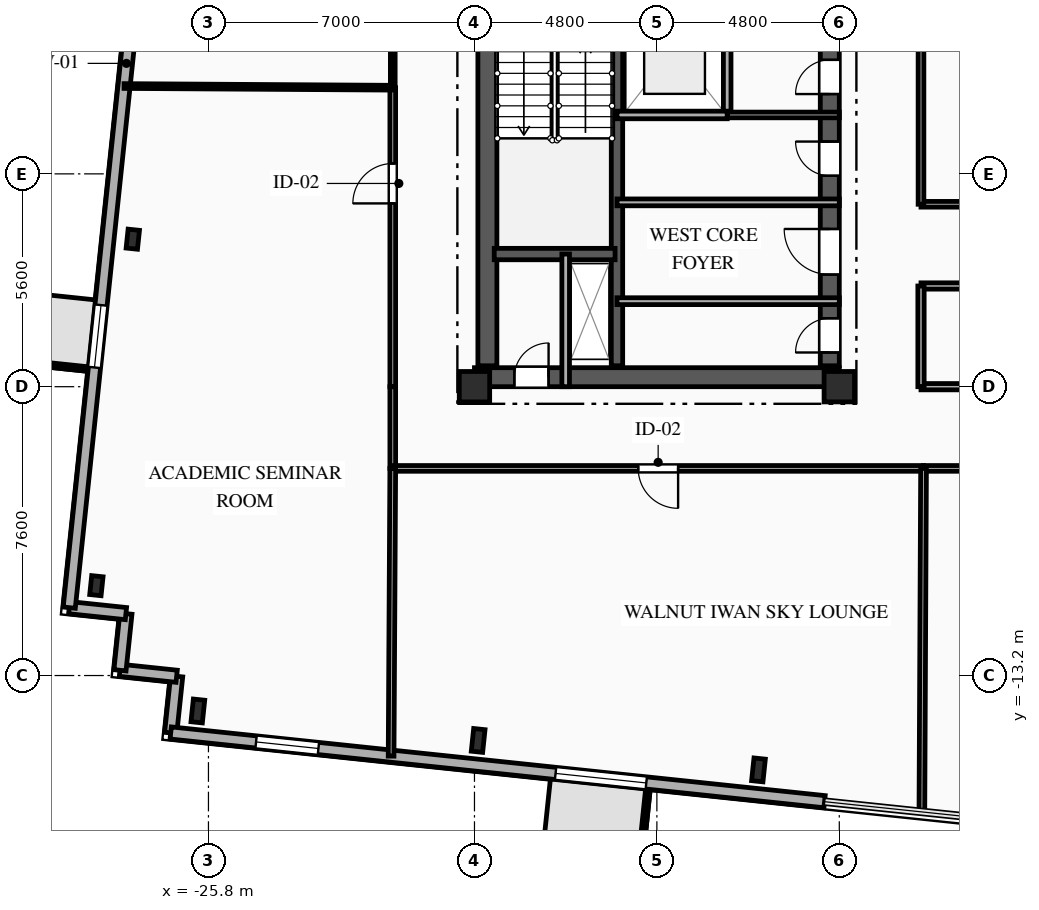
"""IFC4 building model, lengths in metres.
Left out: names, types, materials, properties, quantities, classifications, styles, units other than length and angle.
Written with IfcOpenShell. Run it as: python <this file> out.ifc"""

import sys

from ifc_helpers import new_model, si_unit, direction, frame, frame_2d, origin, origin_2d, place, context, subcontext, project, spatial, rectangle, i_section, extrude, element, fill, save


model = new_model("IFC4")
c1 = context("Model", 3, precision=1e-05, world=origin(), true_north=direction((0.0, 1.0)))
c2 = subcontext(c1, "Body", "Model", "MODEL_VIEW")
j1 = project(units=[si_unit("LENGTHUNIT", "METRE"), si_unit("PLANEANGLEUNIT", "RADIAN")], contexts=[c1])
p1 = place(None, origin())
s1 = spatial("IfcSite", under=j1, at=p1, CompositionType="ELEMENT")
p2 = place(p1, origin())
s2 = spatial("IfcBuilding", under=s1, at=p2, CompositionType="ELEMENT")
p3 = place(p2, frame((0.0, 0.0, 199.75)))
s3 = spatial("IfcBuildingStorey", under=s2, at=p3, CompositionType="ELEMENT", Elevation=199.75)
for number, where, z_axis, x_axis in (
    (1, (-18.8, -5.6, 0.0), (0.0, 0.0, 1.0), (1.0, 0.0, 0.0)),
    (2, (-9.2, -5.6, 0.0), (0.0, 0.0, 1.0), (1.0, 0.0, 0.0)),
):
    element("IfcColumn", number, at=place(p3, frame(where, z_axis=z_axis, x_axis=x_axis)), inside=s3, PredefinedType="COLUMN", context=c2, shape_type="SweptSolid", body=[
        extrude(rectangle(XDim=0.8, YDim=0.8, at=origin_2d()), origin(), (0.0, 0.0, 1.0), 3.35),
    ])
for number, where, z_axis, x_axis in (
    (3, (-26.079, -14.133, 0.0), (0.0, 0.0, 1.0), (0.995, -0.105, 0.0)),
    (4, (-18.703, -14.908, 0.0), (0.0, 0.0, 1.0), (0.995, -0.105, 0.0)),
    (5, (-11.327, -15.683, 0.0), (0.0, 0.0, 1.0), (0.995, -0.105, 0.0)),
):
    element("IfcColumn", number, at=place(p3, frame(where, z_axis=z_axis, x_axis=x_axis)), inside=s3, PredefinedType="COLUMN", context=c2, shape_type="SweptSolid", body=[
        extrude(i_section(OverallWidth=0.3, OverallDepth=0.6, WebThickness=0.015, FlangeThickness=0.03, FilletRadius=0.027, at=origin_2d()), origin(), (0.0, 0.0, 1.0), 3.35),
    ])
for number, where, z_axis, x_axis in (
    (6, (-27.791, -1.719, 0.0), (0.0, 0.0, 1.0), (0.995, -0.105, 0.0)),
    (7, (-28.749, -10.835, 0.0), (0.0, 0.0, 1.0), (0.995, -0.105, 0.0)),
):
    element("IfcColumn", number, at=place(p3, frame(where, z_axis=z_axis, x_axis=x_axis)), inside=s3, PredefinedType="COLUMN", context=c2, shape_type="SweptSolid", body=[
        extrude(i_section(OverallWidth=0.3, OverallDepth=0.5, WebThickness=0.014, FlangeThickness=0.028, FilletRadius=0.027, at=origin_2d()), origin(), (0.0, 0.0, 1.0), 3.35),
    ])
for number, where, z_axis, x_axis in (
    (8, (-26.793, -14.711, 0.0), (0.0, 0.0, 1.0), (0.104, 0.995, 0.0)),
    (9, (-26.637, -13.219, 0.0), (0.0, 0.0, 1.0), (-0.995, 0.104, 0.0)),
):
    element("IfcWall", number, at=place(p3, frame(where, z_axis=z_axis, x_axis=x_axis)), inside=s3, PredefinedType="SOLIDWALL", context=c2, shape_type="SweptSolid", body=[
        extrude(rectangle(XDim=1.5, YDim=0.32, at=frame_2d((0.75, 0.0))), origin(), (0.0, 0.0, 1.0), 3.04),
    ])
p4 = place(p3, frame((-28.128, -13.062, 0.0), z_axis=(0.0, 0.0, 1.0), x_axis=(0.104481464157, 0.994526834051, 0.0)))
e10 = element("IfcWall", 10, at=p4, inside=s3, PredefinedType="SOLIDWALL", context=c2, shape_type="SweptSolid", body=[
    extrude(rectangle(XDim=1.5, YDim=0.32, at=frame_2d((0.75, 0.0))), origin(), (0.0, 0.0, 1.0), 3.04),
])
p5 = place(p3, frame((-27.972, -11.571, 0.0), z_axis=(0.0, 0.0, 1.0), x_axis=(-0.994525057048, 0.104498377516, 0.0)))
e11 = element("IfcWall", 11, at=p5, inside=s3, PredefinedType="SOLIDWALL", context=c2, shape_type="SweptSolid", body=[
    extrude(rectangle(XDim=1.5, YDim=0.32, at=frame_2d((0.75, 0.0))), origin(), (0.0, 0.0, 1.0), 3.04),
])
p6 = place(p3, frame((-29.463, -11.414, 0.0), z_axis=(0.0, 0.0, 1.0), x_axis=(0.104530779244, 0.994521651947, 0.0)))
e12 = element("IfcWall", 12, at=p6, inside=s3, PredefinedType="SOLIDWALL", context=c2, shape_type="SweptSolid", body=[
    extrude(rectangle(XDim=28.8, YDim=0.32, at=frame_2d((14.4, 0.0))), origin(), (0.0, 0.0, 1.0), 3.04),
])
p7 = place(p6, frame((6.355, 0.0, 0.85)))
e13 = element("IfcOpeningElement", 13, at=p7, cuts=e12, PredefinedType="OPENING", context=c2, shape_type="SweptSolid", body=[
    extrude(rectangle(XDim=1.65, YDim=1.85, at=frame_2d((0.825, 0.925))), frame((0.0, 0.17, 0.0), z_axis=(0.0, -1.0, 0.0), x_axis=(1.0, 0.0, 0.0)), (0.0, 0.0, 1.0), 0.34),
])
p8 = place(p6, frame((20.389, 0.0, 0.85)))
e14 = element("IfcOpeningElement", 14, at=p8, cuts=e12, PredefinedType="OPENING", context=c2, shape_type="SweptSolid", body=[
    extrude(rectangle(XDim=1.5, YDim=1.85, at=frame_2d((0.75, 0.925))), frame((0.0, 0.17, 0.0), z_axis=(0.0, -1.0, 0.0), x_axis=(1.0, 0.0, 0.0)), (0.0, 0.0, 1.0), 0.34),
])
p9 = place(p3, frame((-9.588, -16.519, 0.0), z_axis=(0.0, 0.0, 1.0), x_axis=(-0.994521911171, 0.104528312915, 0.0)))
e15 = element("IfcWall", 15, at=p9, inside=s3, PredefinedType="SOLIDWALL", context=c2, shape_type="SweptSolid", body=[
    extrude(rectangle(XDim=17.3, YDim=0.32, at=frame_2d((8.65, 0.0))), origin(), (0.0, 0.0, 1.0), 3.04),
])
p10 = place(p9, frame((4.717, 0.0, 0.85)))
e16 = element("IfcOpeningElement", 16, at=p10, cuts=e15, PredefinedType="OPENING", context=c2, shape_type="SweptSolid", body=[
    extrude(rectangle(XDim=2.4, YDim=1.95, at=frame_2d((1.2, 0.975))), frame((0.0, 0.17, 0.0), z_axis=(0.0, -1.0, 0.0), x_axis=(1.0, 0.0, 0.0)), (0.0, 0.0, 1.0), 0.34),
])
p11 = place(p9, frame((13.392, 0.0, 0.85)))
e17 = element("IfcOpeningElement", 17, at=p11, cuts=e15, PredefinedType="OPENING", context=c2, shape_type="SweptSolid", body=[
    extrude(rectangle(XDim=1.65, YDim=1.85, at=frame_2d((0.825, 0.925))), frame((0.0, 0.17, 0.0), z_axis=(0.0, -1.0, 0.0), x_axis=(1.0, 0.0, 0.0)), (0.0, 0.0, 1.0), 0.34),
])
p12 = place(p3, frame((-18.8, -5.35, 0.0), z_axis=(0.0, 0.0, 1.0), x_axis=(1.0, 0.0, 0.0)))
e18 = element("IfcWall", 18, at=p12, inside=s3, PredefinedType="SHEAR", context=c2, shape_type="SweptSolid", body=[
    extrude(rectangle(XDim=9.6, YDim=0.5, at=frame_2d((4.8, 0.0))), origin(), (0.0, 0.0, 1.0), 3.04),
])
p13 = place(p12, frame((1.05, 0.0, 0.0)))
e19 = element("IfcOpeningElement", 19, at=p13, cuts=e18, PredefinedType="OPENING", context=c2, shape_type="SweptSolid", body=[
    extrude(rectangle(XDim=0.9, YDim=2.1, at=frame_2d((0.45, 1.05))), frame((0.0, 0.26, 0.0), z_axis=(0.0, -1.0, 0.0), x_axis=(1.0, 0.0, 0.0)), (0.0, 0.0, 1.0), 0.52),
])
p14 = place(p3, frame((-18.46, -5.05, 0.0), z_axis=(0.0, 0.0, 1.0), x_axis=(0.0, 1.0, 0.0)))
e20 = element("IfcWall", 20, at=p14, inside=s3, PredefinedType="SHEAR", context=c2, shape_type="SweptSolid", body=[
    extrude(rectangle(XDim=10.1, YDim=0.5, at=frame_2d((5.05, 0.0))), origin(), (0.0, 0.0, 1.0), 3.04),
])
p15 = place(p3, frame((-9.45, -5.05, 0.0), z_axis=(0.0, 0.0, 1.0), x_axis=(0.0, 1.0, 0.0)))
e21 = element("IfcWall", 21, at=p15, inside=s3, PredefinedType="SHEAR", context=c2, shape_type="SweptSolid", body=[
    extrude(rectangle(XDim=10.1, YDim=0.5, at=frame_2d((5.05, 0.0))), origin(), (0.0, 0.0, 1.0), 3.04),
])
p16 = place(p15, frame((7.15, 0.0, 0.0)))
e22 = element("IfcOpeningElement", 22, at=p16, cuts=e21, PredefinedType="OPENING", context=c2, shape_type="SweptSolid", body=[
    extrude(rectangle(XDim=0.9, YDim=2.1, at=frame_2d((0.45, 1.05))), frame((0.0, 0.26, 0.0), z_axis=(0.0, -1.0, 0.0), x_axis=(1.0, 0.0, 0.0)), (0.0, 0.0, 1.0), 0.52),
])
p17 = place(p15, frame((2.4, 0.0, 0.0)))
e23 = element("IfcOpeningElement", 23, at=p17, cuts=e21, PredefinedType="OPENING", context=c2, shape_type="SweptSolid", body=[
    extrude(rectangle(XDim=1.2, YDim=2.15, at=frame_2d((0.6, 1.075))), frame((0.0, 0.26, 0.0), z_axis=(0.0, -1.0, 0.0), x_axis=(1.0, 0.0, 0.0)), (0.0, 0.0, 1.0), 0.52),
])
p18 = place(p15, frame((0.35, 0.0, 0.0)))
e24 = element("IfcOpeningElement", 24, at=p18, cuts=e21, PredefinedType="OPENING", context=c2, shape_type="SweptSolid", body=[
    extrude(rectangle(XDim=0.9, YDim=2.1, at=frame_2d((0.45, 1.05))), frame((0.0, 0.26, 0.0), z_axis=(0.0, -1.0, 0.0), x_axis=(1.0, 0.0, 0.0)), (0.0, 0.0, 1.0), 0.52),
])
p19 = place(p15, frame((5.0, 0.0, 0.0)))
e25 = element("IfcOpeningElement", 25, at=p19, cuts=e21, PredefinedType="OPENING", context=c2, shape_type="SweptSolid", body=[
    extrude(rectangle(XDim=0.9, YDim=2.1, at=frame_2d((0.45, 1.05))), frame((0.0, 0.26, 0.0), z_axis=(0.0, -1.0, 0.0), x_axis=(1.0, 0.0, 0.0)), (0.0, 0.0, 1.0), 0.52),
])
p20 = place(p3, frame((-15.05, -5.05, 0.0), z_axis=(0.0, 0.0, 1.0), x_axis=(0.0, 1.0, 0.0)))
e26 = element("IfcWall", 26, at=p20, inside=s3, PredefinedType="SHEAR", context=c2, shape_type="SweptSolid", body=[
    extrude(rectangle(XDim=10.1, YDim=0.3, at=frame_2d((5.05, 0.0))), origin(), (0.0, 0.0, 1.0), 3.04),
])
p21 = place(p3, frame((-18.28, -2.11, 0.0), z_axis=(0.0, 0.0, 1.0), x_axis=(1.0, 0.0, 0.0)))
e27 = element("IfcWall", 27, at=p21, inside=s3, PredefinedType="SHEAR", context=c2, shape_type="SweptSolid", body=[
    extrude(rectangle(XDim=3.18, YDim=0.3, at=frame_2d((1.59, 0.0))), origin(), (0.0, 0.0, 1.0), 3.04),
])
p22 = place(p3, frame((-16.4, -5.6, 0.0), z_axis=(0.0, 0.0, 1.0), x_axis=(0.0, 1.0, 0.0)))
e28 = element("IfcWall", 28, at=p22, inside=s3, PredefinedType="PARTITIONING", context=c2, shape_type="SweptSolid", body=[
    extrude(rectangle(XDim=3.49, YDim=0.2, at=frame_2d((1.745, 0.0))), origin(), (0.0, 0.0, 1.0), 3.04),
])
p23 = place(p3, frame((-12.15, 1.55, 0.0), z_axis=(0.0, 0.0, 1.0), x_axis=(0.0, 1.0, 0.0)))
e29 = element("IfcWall", 29, at=p23, inside=s3, PredefinedType="PARTITIONING", context=c2, shape_type="SweptSolid", body=[
    extrude(rectangle(XDim=4.05, YDim=0.2, at=frame_2d((2.025, 0.0))), origin(), (0.0, 0.0, 1.0), 3.04),
])
p24 = place(p3, frame((-12.15, 1.55, 0.0), z_axis=(0.0, 0.0, 1.0), x_axis=(1.0, 0.0, 0.0)))
e30 = element("IfcWall", 30, at=p24, inside=s3, PredefinedType="PARTITIONING", context=c2, shape_type="SweptSolid", body=[
    extrude(rectangle(XDim=2.95, YDim=0.15, at=frame_2d((1.475, 0.0))), origin(), (0.0, 0.0, 1.0), 3.04),
])
p25 = place(p3, frame((-15.05, -3.35, 0.0), z_axis=(0.0, 0.0, 1.0), x_axis=(1.0, 0.0, 0.0)))
e31 = element("IfcWall", 31, at=p25, inside=s3, PredefinedType="PARTITIONING", context=c2, shape_type="SweptSolid", body=[
    extrude(rectangle(XDim=5.85, YDim=0.18, at=frame_2d((2.925, 0.0))), origin(), (0.0, 0.0, 1.0), 2.755),
])
p26 = place(p3, frame((-9.2, -0.75, 0.0), z_axis=(0.0, 0.0, 1.0), x_axis=(-1.0, 0.0, 0.0)))
e32 = element("IfcWall", 32, at=p26, inside=s3, PredefinedType="PARTITIONING", context=c2, shape_type="SweptSolid", body=[
    extrude(rectangle(XDim=5.85, YDim=0.18, at=frame_2d((2.925, 0.0))), origin(), (0.0, 0.0, 1.0), 3.04),
])
p27 = place(p3, frame((-20.95, -7.75, 0.0), z_axis=(0.0, 0.0, 1.0), x_axis=(0.0, 1.0, 0.0)))
e33 = element("IfcWall", 33, at=p27, inside=s3, PredefinedType="PARTITIONING", context=c2, shape_type="SweptSolid", body=[
    extrude(rectangle(XDim=2.15, YDim=0.15, at=frame_2d((1.075, 0.0))), origin(), (0.0, 0.0, 1.0), 3.04),
])
p28 = place(p3, frame((-6.983, -7.75, 0.0), z_axis=(0.0, 0.0, 1.0), x_axis=(-1.0, 0.0, 0.0)))
e34 = element("IfcWall", 34, at=p28, inside=s3, PredefinedType="PARTITIONING", context=c2, shape_type="SweptSolid", body=[
    extrude(rectangle(XDim=13.967, YDim=0.15, at=frame_2d((6.983, 0.0))), origin(), (0.0, 0.0, 1.0), 3.04),
])
p29 = place(p28, frame((6.458, 0.0, 0.0)))
e35 = element("IfcOpeningElement", 35, at=p29, cuts=e34, PredefinedType="OPENING", context=c2, shape_type="SweptSolid", body=[
    extrude(rectangle(XDim=1.05, YDim=2.15, at=frame_2d((0.525, 1.075))), frame((0.0, 0.085, 0.0), z_axis=(0.0, -1.0, 0.0), x_axis=(1.0, 0.0, 0.0)), (0.0, 0.0, 1.0), 0.17),
])
p30 = place(p3, frame((0.0, -7.75, 0.0), z_axis=(0.0, 0.0, 1.0), x_axis=(-1.0, 0.0, 0.0)))
e36 = element("IfcWall", 36, at=p30, inside=s3, PredefinedType="PARTITIONING", context=c2, shape_type="SweptSolid", body=[
    extrude(rectangle(XDim=6.983, YDim=0.15, at=frame_2d((3.491, 0.0))), origin(), (0.0, 0.0, 1.0), 3.04),
])
p31 = place(p30, frame((1.177, 0.0, 0.0)))
e37 = element("IfcOpeningElement", 37, at=p31, cuts=e36, PredefinedType="OPENING", context=c2, shape_type="SweptSolid", body=[
    extrude(rectangle(XDim=1.05, YDim=2.15, at=frame_2d((0.525, 1.075))), frame((0.0, 0.085, 0.0), z_axis=(0.0, -1.0, 0.0), x_axis=(1.0, 0.0, 0.0)), (0.0, 0.0, 1.0), 0.17),
])
p32 = place(p3, frame((-7.05, -5.6, 0.0), z_axis=(0.0, 0.0, 1.0), x_axis=(1.0, 0.0, 0.0)))
e38 = element("IfcWall", 38, at=p32, inside=s3, PredefinedType="PARTITIONING", context=c2, shape_type="SweptSolid", body=[
    extrude(rectangle(XDim=7.05, YDim=0.165, at=frame_2d((3.525, 0.0))), origin(), (0.0, 0.0, 1.0), 2.525),
])
p33 = place(p3, frame((-20.95, -5.6, 0.0), z_axis=(0.0, 0.0, 1.0), x_axis=(0.0, 1.0, 0.0)))
e39 = element("IfcWall", 39, at=p33, inside=s3, PredefinedType="PARTITIONING", context=c2, shape_type="SweptSolid", body=[
    extrude(rectangle(XDim=7.867, YDim=0.15, at=frame_2d((3.934, 0.0))), origin(), (0.0, 0.0, 1.0), 3.04),
])
p34 = place(p33, frame((4.823, 0.0, 0.0)))
e40 = element("IfcOpeningElement", 40, at=p34, cuts=e39, PredefinedType="OPENING", context=c2, shape_type="SweptSolid", body=[
    extrude(rectangle(XDim=1.05, YDim=2.15, at=frame_2d((0.525, 1.075))), frame((0.0, 0.085, 0.0), z_axis=(0.0, -1.0, 0.0), x_axis=(1.0, 0.0, 0.0)), (0.0, 0.0, 1.0), 0.17),
])
p35 = place(p3, frame((-20.95, 2.267, 0.0), z_axis=(0.0, 0.0, 1.0), x_axis=(0.0, 1.0, 0.0)))
e41 = element("IfcWall", 41, at=p35, inside=s3, PredefinedType="PARTITIONING", context=c2, shape_type="SweptSolid", body=[
    extrude(rectangle(XDim=6.233, YDim=0.125, at=frame_2d((3.116, 0.0))), origin(), (0.0, 0.0, 1.0), 3.04),
])
p36 = place(p35, frame((1.095, 0.0, 0.0)))
e42 = element("IfcOpeningElement", 42, at=p36, cuts=e41, PredefinedType="OPENING", context=c2, shape_type="SweptSolid", body=[
    extrude(rectangle(XDim=0.95, YDim=2.1, at=frame_2d((0.475, 1.05))), frame((0.0, 0.073, 0.0), z_axis=(0.0, -1.0, 0.0), x_axis=(1.0, 0.0, 0.0)), (0.0, 0.0, 1.0), 0.145),
])
p37 = place(p3, frame((-7.05, -0.8, 0.0), z_axis=(0.0, 0.0, 1.0), x_axis=(1.0, 0.0, 0.0)))
e43 = element("IfcWall", 43, at=p37, inside=s3, PredefinedType="PARTITIONING", context=c2, shape_type="SweptSolid", body=[
    extrude(rectangle(XDim=14.1, YDim=0.15, at=frame_2d((7.05, 0.0))), origin(), (0.0, 0.0, 1.0), 3.04),
])
p38 = place(p37, frame((6.525, 0.0, 0.0)))
e44 = element("IfcOpeningElement", 44, at=p38, cuts=e43, PredefinedType="OPENING", context=c2, shape_type="SweptSolid", body=[
    extrude(rectangle(XDim=1.05, YDim=2.15, at=frame_2d((0.525, 1.075))), frame((0.0, 0.085, 0.0), z_axis=(0.0, -1.0, 0.0), x_axis=(1.0, 0.0, 0.0)), (0.0, 0.0, 1.0), 0.17),
])
p39 = place(p3, frame((7.05, -2.95, 0.0), z_axis=(0.0, 0.0, 1.0), x_axis=(-1.0, 0.0, 0.0)))
e45 = element("IfcWall", 45, at=p39, inside=s3, PredefinedType="PARTITIONING", context=c2, shape_type="SweptSolid", body=[
    extrude(rectangle(XDim=14.1, YDim=0.165, at=frame_2d((7.05, 0.0))), origin(), (0.0, 0.0, 1.0), 3.04),
])
p40 = place(p39, frame((6.475, 0.0, 0.0)))
e46 = element("IfcOpeningElement", 46, at=p40, cuts=e45, PredefinedType="OPENING", context=c2, shape_type="SweptSolid", body=[
    extrude(rectangle(XDim=1.15, YDim=2.15, at=frame_2d((0.575, 1.075))), frame((0.0, 0.093, 0.0), z_axis=(0.0, -1.0, 0.0), x_axis=(1.0, 0.0, 0.0)), (0.0, 0.0, 1.0), 0.185),
])
p41 = place(p3, frame((-7.05, 8.5, 0.0), z_axis=(0.0, 0.0, 1.0), x_axis=(0.0, -1.0, 0.0)))
e47 = element("IfcWall", 47, at=p41, inside=s3, PredefinedType="PARTITIONING", context=c2, shape_type="SweptSolid", body=[
    extrude(rectangle(XDim=9.3, YDim=0.15, at=frame_2d((4.65, 0.0))), origin(), (0.0, 0.0, 1.0), 3.04),
])
p42 = place(p3, frame((-7.05, -2.95, 0.0), z_axis=(0.0, 0.0, 1.0), x_axis=(0.0, -1.0, 0.0)))
e48 = element("IfcWall", 48, at=p42, inside=s3, PredefinedType="PARTITIONING", context=c2, shape_type="SweptSolid", body=[
    extrude(rectangle(XDim=2.65, YDim=0.165, at=frame_2d((1.325, 0.0))), origin(), (0.0, 0.0, 1.0), 3.04),
])
p43 = place(p3, frame((-28.021, 2.311, 0.0), z_axis=(0.0, 0.0, 1.0), x_axis=(0.99998090118, -0.006180394355, 0.0)))
e49 = element("IfcWall", 49, at=p43, inside=s3, PredefinedType="PARTITIONING", context=c2, shape_type="SweptSolid", body=[
    extrude(rectangle(XDim=7.071, YDim=0.125, at=frame_2d((3.536, 0.0))), origin(), (0.0, 0.0, 1.0), 3.04),
])
p44 = place(p3, frame((-20.95, -7.75, 0.0), z_axis=(0.0, 0.0, 1.0), x_axis=(-0.005804668564, -0.99998315277, 0.0)))
e50 = element("IfcWall", 50, at=p44, inside=s3, PredefinedType="PARTITIONING", context=c2, shape_type="SweptSolid", body=[
    extrude(rectangle(XDim=7.571, YDim=0.15, at=frame_2d((3.785, 0.0))), origin(), (0.0, 0.0, 1.0), 3.04),
])
p45 = place(p3, frame((-6.983, -7.75, 0.0), z_axis=(0.0, 0.0, 1.0), x_axis=(-0.004861916497, -0.999988180814, 0.0)))
e51 = element("IfcWall", 51, at=p45, inside=s3, PredefinedType="PARTITIONING", context=c2, shape_type="SweptSolid", body=[
    extrude(rectangle(XDim=9.039, YDim=0.15, at=frame_2d((4.519, 0.0))), origin(), (0.0, 0.0, 1.0), 3.04),
])
p46 = place(p3, frame((-15.05, 1.55, 0.0), z_axis=(0.0, 0.0, 1.0), x_axis=(1.0, 0.0, 0.0)))
e52 = element("IfcWall", 52, at=p46, inside=s3, PredefinedType="PARTITIONING", context=c2, shape_type="SweptSolid", body=[
    extrude(rectangle(XDim=2.9, YDim=0.2, at=frame_2d((1.45, 0.0))), origin(), (0.0, 0.0, 1.0), 3.04),
])
p47 = place(p7, origin())
e53 = element("IfcWindow", 53, at=p47, inside=s3, PartitioningType="SINGLE_PANEL", PredefinedType="WINDOW", context=c2, shape_type="SweptSolid", body=[
    extrude(rectangle(XDim=1.65, YDim=1.85, at=frame_2d((0.825, 0.925))), frame((0.0, 0.03, 0.0), z_axis=(0.0, -1.0, 0.0), x_axis=(1.0, 0.0, 0.0)), (0.0, 0.0, 1.0), 0.06),
])
fill(e13, e53)
p48 = place(p10, origin())
e54 = element("IfcWindow", 54, at=p48, inside=s3, PartitioningType="SINGLE_PANEL", PredefinedType="WINDOW", context=c2, shape_type="SweptSolid", body=[
    extrude(rectangle(XDim=2.4, YDim=1.95, at=frame_2d((1.2, 0.975))), frame((0.0, 0.03, 0.0), z_axis=(0.0, -1.0, 0.0), x_axis=(1.0, 0.0, 0.0)), (0.0, 0.0, 1.0), 0.06),
])
fill(e16, e54)
p49 = place(p11, origin())
e55 = element("IfcWindow", 55, at=p49, inside=s3, PartitioningType="SINGLE_PANEL", PredefinedType="WINDOW", context=c2, shape_type="SweptSolid", body=[
    extrude(rectangle(XDim=1.65, YDim=1.85, at=frame_2d((0.825, 0.925))), frame((0.0, 0.03, 0.0), z_axis=(0.0, -1.0, 0.0), x_axis=(1.0, 0.0, 0.0)), (0.0, 0.0, 1.0), 0.06),
])
fill(e17, e55)
p50 = place(p13, origin())
e56 = element("IfcDoor", 56, at=p50, inside=s3, OperationType="SINGLE_SWING_RIGHT", PredefinedType="DOOR", context=c2, shape_type="SweptSolid", body=[
    extrude(rectangle(XDim=0.9, YDim=2.1, at=frame_2d((0.45, 1.05))), frame((0.0, 0.025, 0.0), z_axis=(0.0, -1.0, 0.0), x_axis=(1.0, 0.0, 0.0)), (0.0, 0.0, 1.0), 0.05),
])
fill(e19, e56)
p51 = place(p16, origin())
e57 = element("IfcDoor", 57, at=p51, inside=s3, OperationType="SINGLE_SWING_LEFT", PredefinedType="DOOR", context=c2, shape_type="SweptSolid", body=[
    extrude(rectangle(XDim=0.9, YDim=2.1, at=frame_2d((0.45, 1.05))), frame((0.0, 0.025, 0.0), z_axis=(0.0, -1.0, 0.0), x_axis=(1.0, 0.0, 0.0)), (0.0, 0.0, 1.0), 0.05),
])
fill(e22, e57)
p52 = place(p17, origin())
e58 = element("IfcDoor", 58, at=p52, inside=s3, OperationType="SINGLE_SWING_RIGHT", PredefinedType="DOOR", context=c2, shape_type="SweptSolid", body=[
    extrude(rectangle(XDim=1.2, YDim=2.15, at=frame_2d((0.6, 1.075))), frame((0.0, 0.025, 0.0), z_axis=(0.0, -1.0, 0.0), x_axis=(1.0, 0.0, 0.0)), (0.0, 0.0, 1.0), 0.05),
])
fill(e23, e58)
p53 = place(p18, origin())
e59 = element("IfcDoor", 59, at=p53, inside=s3, OperationType="SINGLE_SWING_LEFT", PredefinedType="DOOR", context=c2, shape_type="SweptSolid", body=[
    extrude(rectangle(XDim=0.9, YDim=2.1, at=frame_2d((0.45, 1.05))), frame((0.0, 0.025, 0.0), z_axis=(0.0, -1.0, 0.0), x_axis=(1.0, 0.0, 0.0)), (0.0, 0.0, 1.0), 0.05),
])
fill(e24, e59)
p54 = place(p19, origin())
e60 = element("IfcDoor", 60, at=p54, inside=s3, OperationType="SINGLE_SWING_RIGHT", PredefinedType="DOOR", context=c2, shape_type="SweptSolid", body=[
    extrude(rectangle(XDim=0.9, YDim=2.1, at=frame_2d((0.45, 1.05))), frame((0.0, 0.025, 0.0), z_axis=(0.0, -1.0, 0.0), x_axis=(1.0, 0.0, 0.0)), (0.0, 0.0, 1.0), 0.05),
])
fill(e25, e60)
p55 = place(p29, origin())
e61 = element("IfcDoor", 61, at=p55, inside=s3, OperationType="SINGLE_SWING_LEFT", PredefinedType="DOOR", context=c2, shape_type="SweptSolid", body=[
    extrude(rectangle(XDim=1.05, YDim=2.15, at=frame_2d((0.525, 1.075))), frame((0.0, 0.025, 0.0), z_axis=(0.0, -1.0, 0.0), x_axis=(1.0, 0.0, 0.0)), (0.0, 0.0, 1.0), 0.05),
])
fill(e35, e61)
p56 = place(p34, origin())
e62 = element("IfcDoor", 62, at=p56, inside=s3, OperationType="SINGLE_SWING_LEFT", PredefinedType="DOOR", context=c2, shape_type="SweptSolid", body=[
    extrude(rectangle(XDim=1.05, YDim=2.15, at=frame_2d((0.525, 1.075))), frame((0.0, 0.025, 0.0), z_axis=(0.0, -1.0, 0.0), x_axis=(1.0, 0.0, 0.0)), (0.0, 0.0, 1.0), 0.05),
])
fill(e40, e62)
save(model, sys.argv[1])
